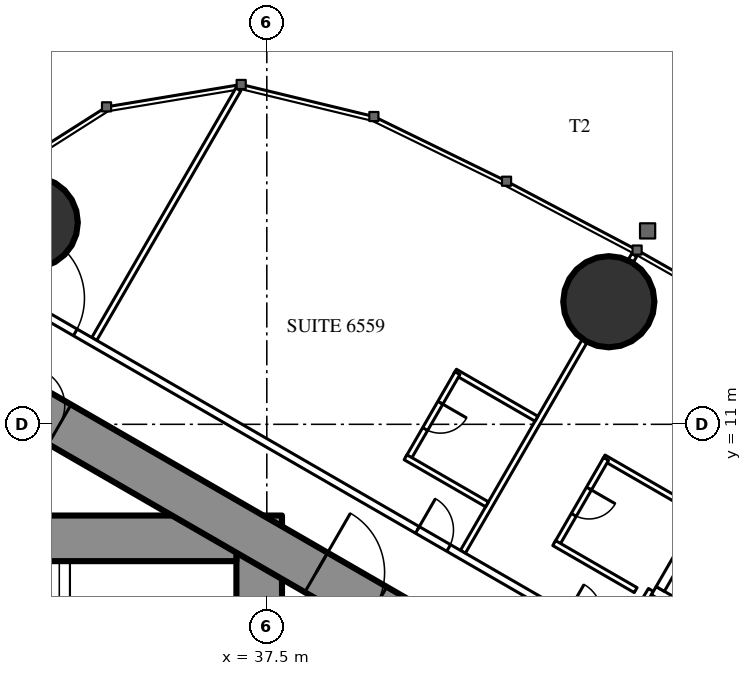
"""IFC4 building model, lengths in metres.
Left out: names, types, materials, properties, quantities, classifications, styles, units other than length and angle.
Written with IfcOpenShell. Run it as: python <this file> out.ifc"""

import sys

from ifc_helpers import new_model, si_unit, direction, frame, frame_2d, origin, origin_2d, place, context, subcontext, project, spatial, rectangle, circle, extrude, element, fill, save


model = new_model("IFC4")
c1 = context("Model", 3, precision=1e-05, world=origin(), true_north=direction((0.0, 1.0)))
c2 = subcontext(c1, "Body", "Model", "MODEL_VIEW")
j1 = project(units=[si_unit("LENGTHUNIT", "METRE"), si_unit("PLANEANGLEUNIT", "RADIAN")], contexts=[c1])
p1 = place(None, origin())
s1 = spatial("IfcSite", under=j1, at=p1, CompositionType="ELEMENT")
p2 = place(p1, origin())
s2 = spatial("IfcBuilding", under=s1, at=p2, CompositionType="ELEMENT")
p3 = place(p2, frame((0.0, 0.0, 244.1)))
s3 = spatial("IfcBuildingStorey", under=s2, at=p3, CompositionType="ELEMENT", Elevation=244.1)
for number, where, z_axis, x_axis in (
    (1, (31.328, 16.311, 0.0), (0.0, 0.0, 1.0), (1.0, 0.0, 0.0)),
    (2, (46.499, 14.226, 0.0), (0.0, 0.0, 1.0), (1.0, 0.0, 0.0)),
):
    element("IfcColumn", number, at=place(p3, frame(where, z_axis=z_axis, x_axis=x_axis)), inside=s3, PredefinedType="COLUMN", context=c2, shape_type="SweptSolid", body=[
        extrude(circle(Radius=1.2, at=origin_2d()), origin(), (0.0, 0.0, 1.0), 3.6),
    ])
p4 = place(p3, frame((37.3, -8.6, 0.0), z_axis=(0.0, 0.0, 1.0), x_axis=(0.0, 1.0, 0.0)))
e3 = element("IfcWall", 3, at=p4, inside=s3, PredefinedType="SHEAR", context=c2, shape_type="SweptSolid", body=[
    extrude(rectangle(XDim=17.2, YDim=1.2, at=frame_2d((8.6, 0.0))), origin(), (0.0, 0.0, 1.0), 3.6),
])
p5 = place(p4, frame((7.7, 0.0, 0.0)))
e4 = element("IfcOpeningElement", 4, at=p5, cuts=e3, PredefinedType="OPENING", context=c2, shape_type="SweptSolid", body=[
    extrude(rectangle(XDim=1.8, YDim=2.2, at=frame_2d((0.9, 1.1))), frame((0.0, 0.61, 0.0), z_axis=(0.0, -1.0, 0.0), x_axis=(1.0, 0.0, 0.0)), (0.0, 0.0, 1.0), 1.22),
])
p6 = place(p3, frame((28.3, 8.0, 0.0), z_axis=(0.0, 0.0, 1.0), x_axis=(1.0, 0.0, 0.0)))
e5 = element("IfcWall", 5, at=p6, inside=s3, PredefinedType="SHEAR", context=c2, shape_type="SweptSolid", body=[
    extrude(rectangle(XDim=8.4, YDim=1.2, at=frame_2d((4.2, 0.0))), origin(), (0.0, 0.0, 1.0), 3.6),
])
p7 = place(p6, frame((0.25, 0.0, 0.0)))
e6 = element("IfcOpeningElement", 6, at=p7, cuts=e5, PredefinedType="OPENING", context=c2, shape_type="SweptSolid", body=[
    extrude(rectangle(XDim=1.0, YDim=2.2, at=frame_2d((0.5, 1.1))), frame((0.0, 0.61, 0.0), z_axis=(0.0, -1.0, 0.0), x_axis=(1.0, 0.0, 0.0)), (0.0, 0.0, 1.0), 1.22),
])
p8 = place(p3, frame((27.2, 13.8, 0.0), z_axis=(0.0, 0.0, 1.0), x_axis=(0.866024515034, -0.500001539357, 0.0)))
e7 = element("IfcWall", 7, at=p8, inside=s3, PredefinedType="SHEAR", context=c2, shape_type="SweptSolid", body=[
    extrude(rectangle(XDim=26.907, YDim=1.2, at=frame_2d((13.454, 0.0))), origin(), (0.0, 0.0, 1.0), 3.6),
])
p9 = place(p8, frame((4.6, 0.0, 0.0)))
e8 = element("IfcOpeningElement", 8, at=p9, cuts=e7, PredefinedType="OPENING", context=c2, shape_type="SweptSolid", body=[
    extrude(rectangle(XDim=1.0, YDim=2.2, at=frame_2d((0.5, 1.1))), frame((0.0, 0.61, 0.0), z_axis=(0.0, -1.0, 0.0), x_axis=(1.0, 0.0, 0.0)), (0.0, 0.0, 1.0), 1.22),
])
p10 = place(p8, frame((13.395, 0.0, 0.0)))
e9 = element("IfcOpeningElement", 9, at=p10, cuts=e7, PredefinedType="OPENING", context=c2, shape_type="SweptSolid", body=[
    extrude(rectangle(XDim=1.8, YDim=2.2, at=frame_2d((0.9, 1.1))), frame((0.0, 0.61, 0.0), z_axis=(0.0, -1.0, 0.0), x_axis=(1.0, 0.0, 0.0)), (0.0, 0.0, 1.0), 1.22),
])
p11 = place(p3, frame((32.96, 13.246, 0.0), z_axis=(0.0, 0.0, 1.0), x_axis=(0.500000236886, 0.866025267018, 0.0)))
e10 = element("IfcWall", 10, at=p11, inside=s3, PredefinedType="PARTITIONING", context=c2, shape_type="SweptSolid", body=[
    extrude(rectangle(XDim=7.583, YDim=0.15, at=frame_2d((3.791, 0.0))), origin(), (0.0, 0.0, 1.0), 3.35),
])
p12 = place(p3, frame((42.66, 7.646, 0.0), z_axis=(0.0, 0.0, 1.0), x_axis=(0.499996592859, 0.866027370889, 0.0)))
e11 = element("IfcWall", 11, at=p12, inside=s3, PredefinedType="PARTITIONING", context=c2, shape_type="SweptSolid", body=[
    extrude(rectangle(XDim=6.398, YDim=0.15, at=frame_2d((3.199, 0.0))), origin(), (0.0, 0.0, 1.0), 2.45),
])
p13 = place(p3, frame((47.079, 15.3, 0.0), z_axis=(0.0, 0.0, 1.0), x_axis=(0.499212083968, 0.866479829667, 0.0)))
e12 = element("IfcWall", 12, at=p13, inside=s3, PredefinedType="PARTITIONING", context=c2, shape_type="SweptSolid", body=[
    extrude(rectangle(XDim=0.179, YDim=0.15, at=frame_2d((0.09, 0.0))), origin(), (0.0, 0.0, 1.0), 2.45),
])
p14 = place(p3, frame((28.959, 15.44, 0.0), z_axis=(0.0, 0.0, 1.0), x_axis=(0.866028936079, -0.499993881836, 0.0)))
e13 = element("IfcWall", 13, at=p14, inside=s3, PredefinedType="PARTITIONING", context=c2, shape_type="SweptSolid", body=[
    extrude(rectangle(XDim=20.503, YDim=0.2, at=frame_2d((10.251, 0.0))), origin(), (0.0, 0.0, 1.0), 3.35),
])
p15 = place(p14, frame((18.953, 0.0, 0.0)))
e14 = element("IfcOpeningElement", 14, at=p15, cuts=e13, PredefinedType="OPENING", context=c2, shape_type="SweptSolid", body=[
    extrude(rectangle(XDim=0.95, YDim=2.2, at=frame_2d((0.475, 1.1))), frame((0.0, 0.11, 0.0), z_axis=(0.0, -1.0, 0.0), x_axis=(1.0, 0.0, 0.0)), (0.0, 0.0, 1.0), 0.22),
])
p16 = place(p14, frame((14.437, 0.0, 0.0)))
e15 = element("IfcOpeningElement", 15, at=p16, cuts=e13, PredefinedType="OPENING", context=c2, shape_type="SweptSolid", body=[
    extrude(rectangle(XDim=0.95, YDim=2.2, at=frame_2d((0.475, 1.1))), frame((0.0, 0.11, 0.0), z_axis=(0.0, -1.0, 0.0), x_axis=(1.0, 0.0, 0.0)), (0.0, 0.0, 1.0), 0.22),
])
p17 = place(p14, frame((2.244, 0.0, 0.0)))
e16 = element("IfcOpeningElement", 16, at=p17, cuts=e13, PredefinedType="OPENING", context=c2, shape_type="SweptSolid", body=[
    extrude(rectangle(XDim=1.8, YDim=2.04, at=frame_2d((0.9, 1.02))), frame((0.0, 0.11, 0.0), z_axis=(0.0, -1.0, 0.0), x_axis=(1.0, 0.0, 0.0)), (0.0, 0.0, 1.0), 0.22),
])
p18 = place(p3, frame((47.606, 6.642, 0.0), z_axis=(0.0, 0.0, 1.0), x_axis=(-0.51353662755, -0.858067673418, 0.0)))
e17 = element("IfcWall", 17, at=p18, inside=s3, PredefinedType="PARTITIONING", context=c2, shape_type="SweptSolid", body=[
    extrude(rectangle(XDim=1.91, YDim=0.15, at=frame_2d((0.955, 0.0))), origin(), (0.0, 0.0, 1.0), 3.35),
])
p19 = place(p3, frame((46.362, 10.127, 0.0), z_axis=(0.0, 0.0, 1.0), x_axis=(0.866006523861, -0.500032699561, 0.0)))
e18 = element("IfcWall", 18, at=p19, inside=s3, PredefinedType="PARTITIONING", context=c2, shape_type="SweptSolid", body=[
    extrude(rectangle(XDim=2.475, YDim=0.15, at=frame_2d((1.237, 0.0))), origin(), (0.0, 0.0, 1.0), 3.35),
])
p20 = place(p3, frame((45.127, 7.838, 0.0), z_axis=(0.0, 0.0, 1.0), x_axis=(0.500006934395, 0.866021400173, 0.0)))
e19 = element("IfcWall", 19, at=p20, inside=s3, PredefinedType="PARTITIONING", context=c2, shape_type="SweptSolid", body=[
    extrude(rectangle(XDim=2.6, YDim=0.15, at=frame_2d((1.3, 0.0))), origin(), (0.0, 0.0, 1.0), 3.35),
])
p21 = place(p20, frame((0.9, 0.0, 0.0)))
e20 = element("IfcOpeningElement", 20, at=p21, cuts=e19, PredefinedType="OPENING", context=c2, shape_type="SweptSolid", body=[
    extrude(rectangle(XDim=0.8, YDim=2.2, at=frame_2d((0.4, 1.1))), frame((0.0, 0.085, 0.0), z_axis=(0.0, -1.0, 0.0), x_axis=(1.0, 0.0, 0.0)), (0.0, 0.0, 1.0), 0.17),
])
p22 = place(p3, frame((45.062, 7.875, 0.0), z_axis=(0.0, 0.0, 1.0), x_axis=(0.866031185235, -0.4999899861, 0.0)))
e21 = element("IfcWall", 21, at=p22, inside=s3, PredefinedType="PARTITIONING", context=c2, shape_type="SweptSolid", body=[
    extrude(rectangle(XDim=2.475, YDim=0.15, at=frame_2d((1.238, 0.0))), origin(), (0.0, 0.0, 1.0), 2.5),
])
p23 = place(p3, frame((42.451, 12.385, 0.0), z_axis=(0.0, 0.0, 1.0), x_axis=(0.866031185235, -0.4999899861, 0.0)))
e22 = element("IfcWall", 22, at=p23, inside=s3, PredefinedType="PARTITIONING", context=c2, shape_type="SweptSolid", body=[
    extrude(rectangle(XDim=2.475, YDim=0.15, at=frame_2d((1.238, 0.0))), origin(), (0.0, 0.0, 1.0), 3.35),
])
p24 = place(p3, frame((41.216, 10.095, 0.0), z_axis=(0.0, 0.0, 1.0), x_axis=(0.499936506574, 0.866062058628, 0.0)))
e23 = element("IfcWall", 23, at=p24, inside=s3, PredefinedType="PARTITIONING", context=c2, shape_type="SweptSolid", body=[
    extrude(rectangle(XDim=2.6, YDim=0.15, at=frame_2d((1.3, 0.0))), origin(), (0.0, 0.0, 1.0), 3.35),
])
p25 = place(p24, frame((0.9, 0.0, 0.0)))
e24 = element("IfcOpeningElement", 24, at=p25, cuts=e23, PredefinedType="OPENING", context=c2, shape_type="SweptSolid", body=[
    extrude(rectangle(XDim=0.8, YDim=2.2, at=frame_2d((0.4, 1.1))), frame((0.0, 0.085, 0.0), z_axis=(0.0, -1.0, 0.0), x_axis=(1.0, 0.0, 0.0)), (0.0, 0.0, 1.0), 0.17),
])
p26 = place(p3, frame((41.151, 10.133, 0.0), z_axis=(0.0, 0.0, 1.0), x_axis=(0.866006523861, -0.500032699561, 0.0)))
e25 = element("IfcWall", 25, at=p26, inside=s3, PredefinedType="PARTITIONING", context=c2, shape_type="SweptSolid", body=[
    extrude(rectangle(XDim=2.475, YDim=0.15, at=frame_2d((1.237, 0.0))), origin(), (0.0, 0.0, 1.0), 2.5),
])
p27 = place(p3, frame((47.681, 6.622, 0.0), z_axis=(0.0, 0.0, 1.0), x_axis=(0.86603344179, -0.499986077507, 0.0)))
e26 = element("IfcWall", 26, at=p27, inside=s3, PredefinedType="PARTITIONING", context=c2, shape_type="SweptSolid", body=[
    extrude(rectangle(XDim=6.6, YDim=0.25, at=frame_2d((3.3, 0.0))), origin(), (0.0, 0.0, 1.0), 3.35),
])
p28 = place(p27, frame((0.75, 0.0, 0.0)))
e27 = element("IfcOpeningElement", 27, at=p28, cuts=e26, PredefinedType="OPENING", context=c2, shape_type="SweptSolid", body=[
    extrude(rectangle(XDim=1.1, YDim=2.2, at=frame_2d((0.55, 1.1))), frame((0.0, 0.135, 0.0), z_axis=(0.0, -1.0, 0.0), x_axis=(1.0, 0.0, 0.0)), (0.0, 0.0, 1.0), 0.27),
])
p29 = place(p27, frame((2.75, 0.0, 0.0)))
e28 = element("IfcOpeningElement", 28, at=p29, cuts=e26, PredefinedType="OPENING", context=c2, shape_type="SweptSolid", body=[
    extrude(rectangle(XDim=1.1, YDim=2.2, at=frame_2d((0.55, 1.1))), frame((0.0, 0.135, 0.0), z_axis=(0.0, -1.0, 0.0), x_axis=(1.0, 0.0, 0.0)), (0.0, 0.0, 1.0), 0.27),
])
p30 = place(p27, frame((4.75, 0.0, 0.0)))
e29 = element("IfcOpeningElement", 29, at=p30, cuts=e26, PredefinedType="OPENING", context=c2, shape_type="SweptSolid", body=[
    extrude(rectangle(XDim=1.1, YDim=2.2, at=frame_2d((0.55, 1.1))), frame((0.0, 0.135, 0.0), z_axis=(0.0, -1.0, 0.0), x_axis=(1.0, 0.0, 0.0)), (0.0, 0.0, 1.0), 0.27),
])
p31 = place(p3, frame((47.852, 6.668, 0.0), z_axis=(0.0, 0.0, 1.0), x_axis=(0.499929347863, 0.866066190972, 0.0)))
e30 = element("IfcWall", 30, at=p31, inside=s3, PredefinedType="PARTITIONING", context=c2, shape_type="SweptSolid", body=[
    extrude(rectangle(XDim=3.201, YDim=0.25, at=frame_2d((1.6, 0.0))), origin(), (0.0, 0.0, 1.0), 3.35),
])
p32 = place(p21, origin())
e31 = element("IfcDoor", 31, at=p32, inside=s3, OperationType="SINGLE_SWING_RIGHT", PredefinedType="DOOR", context=c2, shape_type="SweptSolid", body=[
    extrude(rectangle(XDim=0.8, YDim=2.2, at=frame_2d((0.4, 1.1))), frame((0.0, 0.025, 0.0), z_axis=(0.0, -1.0, 0.0), x_axis=(1.0, 0.0, 0.0)), (0.0, 0.0, 1.0), 0.05),
])
fill(e20, e31)
p33 = place(p25, origin())
e32 = element("IfcDoor", 32, at=p33, inside=s3, OperationType="SINGLE_SWING_RIGHT", PredefinedType="DOOR", context=c2, shape_type="SweptSolid", body=[
    extrude(rectangle(XDim=0.8, YDim=2.2, at=frame_2d((0.4, 1.1))), frame((0.0, 0.025, 0.0), z_axis=(0.0, -1.0, 0.0), x_axis=(1.0, 0.0, 0.0)), (0.0, 0.0, 1.0), 0.05),
])
fill(e24, e32)
p34 = place(p16, origin())
e33 = element("IfcDoor", 33, at=p34, inside=s3, OperationType="SINGLE_SWING_LEFT", PredefinedType="DOOR", context=c2, shape_type="SweptSolid", body=[
    extrude(rectangle(XDim=0.95, YDim=2.2, at=frame_2d((0.475, 1.1))), frame((0.0, 0.025, 0.0), z_axis=(0.0, -1.0, 0.0), x_axis=(1.0, 0.0, 0.0)), (0.0, 0.0, 1.0), 0.05),
])
fill(e15, e33)
p35 = place(p17, origin())
e34 = element("IfcDoor", 34, at=p35, inside=s3, OperationType="DOUBLE_DOOR_SINGLE_SWING", PredefinedType="DOOR", context=c2, shape_type="SweptSolid", body=[
    extrude(rectangle(XDim=1.8, YDim=2.04, at=frame_2d((0.9, 1.02))), frame((0.0, 0.025, 0.0), z_axis=(0.0, -1.0, 0.0), x_axis=(1.0, 0.0, 0.0)), (0.0, 0.0, 1.0), 0.05),
])
fill(e16, e34)
p36 = place(p9, origin())
e35 = element("IfcDoor", 35, at=p36, inside=s3, OperationType="SINGLE_SWING_LEFT", PredefinedType="DOOR", context=c2, shape_type="SweptSolid", body=[
    extrude(rectangle(XDim=1.0, YDim=2.2, at=frame_2d((0.5, 1.1))), frame((0.0, 0.025, 0.0), z_axis=(0.0, -1.0, 0.0), x_axis=(1.0, 0.0, 0.0)), (0.0, 0.0, 1.0), 0.05),
])
fill(e8, e35)
p37 = place(p10, origin())
e36 = element("IfcDoor", 36, at=p37, inside=s3, OperationType="DOUBLE_DOOR_SINGLE_SWING", PredefinedType="DOOR", context=c2, shape_type="SweptSolid", body=[
    extrude(rectangle(XDim=1.8, YDim=2.2, at=frame_2d((0.9, 1.1))), frame((0.0, 0.025, 0.0), z_axis=(0.0, -1.0, 0.0), x_axis=(1.0, 0.0, 0.0)), (0.0, 0.0, 1.0), 0.05),
])
fill(e9, e36)
save(model, sys.argv[1])
